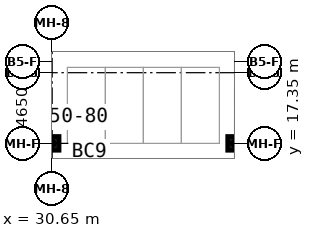
"""IFC4 building model, lengths in metres.
Left out: names, types, materials, properties, quantities, classifications, styles, units other than length and angle.
Written with IfcOpenShell. Run it as: python <this file> out.ifc"""

import sys

from ifc_helpers import new_model, si_unit, direction, frame, origin, origin_2d, place, context, subcontext, project, spatial, rectangle, extrude, source, transform, mapped, element, save


model = new_model("IFC4")
c1 = context("Model", 3, precision=1e-05, world=origin(), true_north=direction((0.0, 1.0)))
c2 = subcontext(c1, "Body", "Model", "MODEL_VIEW")
j1 = project(units=[si_unit("LENGTHUNIT", "METRE"), si_unit("PLANEANGLEUNIT", "RADIAN")], contexts=[c1])
p1 = place(None, origin())
s1 = spatial("IfcSite", under=j1, at=p1, CompositionType="ELEMENT")
p2 = place(p1, origin())
s2 = spatial("IfcBuilding", under=s1, at=p2, CompositionType="ELEMENT")
p3 = place(p2, frame((0.0, 0.0, -4.5)))
s3 = spatial("IfcBuildingStorey", under=s2, at=p3, CompositionType="ELEMENT", Elevation=-4.5)
m1 = source(origin(), c2, "Body", "SweptSolid", [
    extrude(rectangle(XDim=0.9, YDim=0.9, at=origin_2d()), origin(), (0.0, 0.0, 1.0), 4.5),
])
for number, where, z_axis, x_axis in (
    (1, (30.65, 17.35, 0.0), (0.0, 0.0, 1.0), (1.0, 0.0, 0.0)),
    (2, (42.65, 17.35, 0.0), (0.0, 0.0, 1.0), (1.0, 0.0, 0.0)),
):
    element("IfcColumn", number, at=place(p3, frame(where, z_axis=z_axis, x_axis=x_axis)), inside=s3, PredefinedType="COLUMN", context=c2, shape_type="MappedRepresentation", body=[
        mapped(m1, transform((0.0, 0.0, 0.0))),
    ])
save(model, sys.argv[1])
